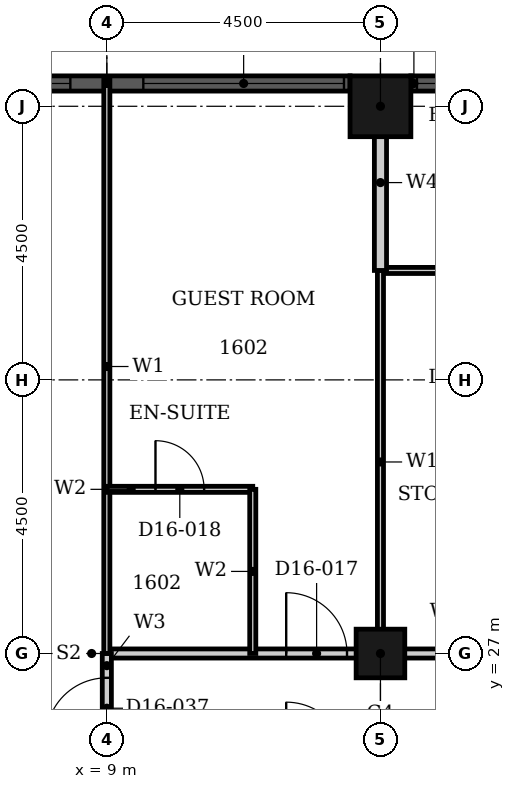
"""IFC4 building model, lengths in metres.
Left out: names, types, materials, properties, quantities, classifications, styles, units other than length and angle.
Written with IfcOpenShell. Run it as: python <this file> out.ifc"""

import sys

from ifc_helpers import new_model, si_unit, direction, frame, frame_2d, origin, origin_2d, place, context, subcontext, project, spatial, rectangle, hollow_rectangle, extrude, element, fill, save


model = new_model("IFC4")
c1 = context("Model", 3, precision=1e-05, world=origin(), true_north=direction((0.0, 1.0)))
c2 = subcontext(c1, "Body", "Model", "MODEL_VIEW")
j1 = project(units=[si_unit("LENGTHUNIT", "METRE"), si_unit("PLANEANGLEUNIT", "RADIAN")], contexts=[c1])
p1 = place(None, origin())
s1 = spatial("IfcSite", under=j1, at=p1, CompositionType="ELEMENT")
p2 = place(p1, origin())
s2 = spatial("IfcBuilding", under=s1, at=p2, CompositionType="ELEMENT")
p3 = place(p2, frame((0.0, 0.0, 70.8)))
s3 = spatial("IfcBuildingStorey", under=s2, at=p3, CompositionType="ELEMENT", Elevation=70.8)
p4 = place(p3, frame((13.5, 36.0, 0.0), z_axis=(0.0, 0.0, 1.0), x_axis=(1.0, 0.0, 0.0)))
e1 = element("IfcColumn", 1, at=p4, inside=s3, PredefinedType="COLUMN", context=c2, shape_type="SweptSolid", body=[
    extrude(hollow_rectangle(XDim=1.0, YDim=1.0, WallThickness=0.032, at=origin_2d()), origin(), (0.0, 0.0, 1.0), 3.6),
])
p5 = place(p3, frame((13.5, 27.0, 0.0), z_axis=(0.0, 0.0, 1.0), x_axis=(1.0, 0.0, 0.0)))
e2 = element("IfcColumn", 2, at=p5, inside=s3, PredefinedType="COLUMN", context=c2, shape_type="SweptSolid", body=[
    extrude(hollow_rectangle(XDim=0.8, YDim=0.8, WallThickness=0.025, at=origin_2d()), origin(), (0.0, 0.0, 1.0), 3.6),
])
p6 = place(p3, frame((15.25, 36.375, 0.0), z_axis=(0.0, 0.0, 1.0), x_axis=(-1.0, 0.0, 0.0)))
e3 = element("IfcWall", 3, at=p6, inside=s3, PredefinedType="SOLIDWALL", context=c2, shape_type="SweptSolid", body=[
    extrude(rectangle(XDim=1.25, YDim=0.25, at=frame_2d((0.625, 0.0))), origin(), (0.0, 0.0, 1.0), 3.6),
])
p7 = place(p6, frame((0.1, 0.0, 0.9)))
e4 = element("IfcOpeningElement", 4, at=p7, cuts=e3, PredefinedType="OPENING", context=c2, shape_type="SweptSolid", body=[
    extrude(rectangle(XDim=1.05, YDim=2.08, at=frame_2d((0.525, 1.04))), frame((0.0, 0.135, 0.0), z_axis=(0.0, -1.0, 0.0), x_axis=(1.0, 0.0, 0.0)), (0.0, 0.0, 1.0), 0.27),
])
p8 = place(p3, frame((13.0, 36.375, 0.0), z_axis=(0.0, 0.0, 1.0), x_axis=(-1.0, 0.0, 0.0)))
e5 = element("IfcWall", 5, at=p8, inside=s3, PredefinedType="SOLIDWALL", context=c2, shape_type="SweptSolid", body=[
    extrude(rectangle(XDim=8.0, YDim=0.25, at=frame_2d((4.0, 0.0))), origin(), (0.0, 0.0, 1.0), 3.6),
])
p9 = place(p8, frame((0.1, 0.0, 0.9)))
e6 = element("IfcOpeningElement", 6, at=p9, cuts=e5, PredefinedType="OPENING", context=c2, shape_type="SweptSolid", body=[
    extrude(rectangle(XDim=3.3, YDim=2.08, at=frame_2d((1.65, 1.04))), frame((0.0, 0.135, 0.0), z_axis=(0.0, -1.0, 0.0), x_axis=(1.0, 0.0, 0.0)), (0.0, 0.0, 1.0), 0.27),
])
p10 = place(p8, frame((4.6, 0.0, 0.9)))
e7 = element("IfcOpeningElement", 7, at=p10, cuts=e5, PredefinedType="OPENING", context=c2, shape_type="SweptSolid", body=[
    extrude(rectangle(XDim=3.3, YDim=2.08, at=frame_2d((1.65, 1.04))), frame((0.0, 0.135, 0.0), z_axis=(0.0, -1.0, 0.0), x_axis=(1.0, 0.0, 0.0)), (0.0, 0.0, 1.0), 0.27),
])
p11 = place(p3, frame((9.0, 27.0, 0.0), z_axis=(0.0, 0.0, 1.0), x_axis=(1.0, 0.0, 0.0)))
e8 = element("IfcWall", 8, at=p11, inside=s3, PredefinedType="PARTITIONING", context=c2, shape_type="SweptSolid", body=[
    extrude(rectangle(XDim=7.2, YDim=0.15, at=frame_2d((3.6, 0.0))), origin(), (0.0, 0.0, 1.0), 2.58),
])
p12 = place(p11, frame((2.95, 0.0, 0.0)))
e9 = element("IfcOpeningElement", 9, at=p12, cuts=e8, PredefinedType="OPENING", context=c2, shape_type="SweptSolid", body=[
    extrude(rectangle(XDim=1.0, YDim=2.1, at=frame_2d((0.5, 1.05))), frame((0.0, 0.085, 0.0), z_axis=(0.0, -1.0, 0.0), x_axis=(1.0, 0.0, 0.0)), (0.0, 0.0, 1.0), 0.17),
])
p13 = place(p3, frame((9.0, 25.2, 0.0), z_axis=(0.0, 0.0, 1.0), x_axis=(0.0, 1.0, 0.0)))
e10 = element("IfcWall", 10, at=p13, inside=s3, PredefinedType="PARTITIONING", context=c2, shape_type="SweptSolid", body=[
    extrude(rectangle(XDim=1.8, YDim=0.15, at=frame_2d((0.9, 0.0))), origin(), (0.0, 0.0, 1.0), 3.3),
])
p14 = place(p13, frame((0.4, 0.0, 0.0)))
e11 = element("IfcOpeningElement", 11, at=p14, cuts=e10, PredefinedType="OPENING", context=c2, shape_type="SweptSolid", body=[
    extrude(rectangle(XDim=1.0, YDim=2.1, at=frame_2d((0.5, 1.05))), frame((0.0, 0.085, 0.0), z_axis=(0.0, -1.0, 0.0), x_axis=(1.0, 0.0, 0.0)), (0.0, 0.0, 1.0), 0.17),
])
p15 = place(p3, frame((13.5, 33.3, 0.0), z_axis=(0.0, 0.0, 1.0), x_axis=(1.0, 0.0, 0.0)))
e12 = element("IfcWall", 12, at=p15, inside=s3, PredefinedType="PARTITIONING", context=c2, shape_type="SweptSolid", body=[
    extrude(rectangle(XDim=2.7, YDim=0.1, at=frame_2d((1.35, 0.0))), origin(), (0.0, 0.0, 1.0), 3.3),
])
p16 = place(p3, frame((13.5, 27.0, 0.0), z_axis=(0.0, 0.0, 1.0), x_axis=(0.0, 1.0, 0.0)))
e13 = element("IfcWall", 13, at=p16, inside=s3, PredefinedType="PARTITIONING", context=c2, shape_type="SweptSolid", body=[
    extrude(rectangle(XDim=6.3, YDim=0.1, at=frame_2d((3.15, 0.0))), origin(), (0.0, 0.0, 1.0), 2.38),
])
p17 = place(p3, frame((9.0, 27.0, 0.0), z_axis=(0.0, 0.0, 1.0), x_axis=(0.0, 1.0, 0.0)))
e14 = element("IfcWall", 14, at=p17, inside=s3, PredefinedType="PARTITIONING", context=c2, shape_type="SweptSolid", body=[
    extrude(rectangle(XDim=9.44, YDim=0.1, at=frame_2d((4.72, 0.0))), origin(), (0.0, 0.0, 1.0), 3.3),
])
p18 = place(p3, frame((13.5, 33.3, 0.0), z_axis=(0.0, 0.0, 1.0), x_axis=(0.0, 1.0, 0.0)))
e15 = element("IfcWall", 15, at=p18, inside=s3, PredefinedType="PARTITIONING", context=c2, shape_type="SweptSolid", body=[
    extrude(rectangle(XDim=2.89, YDim=0.2, at=frame_2d((1.445, 0.0))), origin(), (0.0, 0.0, 1.0), 2.38),
])
p19 = place(p3, frame((9.0, 29.7, 0.0), z_axis=(0.0, 0.0, 1.0), x_axis=(1.0, 0.0, 0.0)))
e16 = element("IfcWall", 16, at=p19, inside=s3, PredefinedType="PARTITIONING", context=c2, shape_type="SweptSolid", body=[
    extrude(rectangle(XDim=2.4, YDim=0.1, at=frame_2d((1.2, 0.0))), origin(), (0.0, 0.0, 1.0), 3.3),
])
p20 = place(p19, frame((0.8, 0.0, 0.0)))
e17 = element("IfcOpeningElement", 17, at=p20, cuts=e16, PredefinedType="OPENING", context=c2, shape_type="SweptSolid", body=[
    extrude(rectangle(XDim=0.8, YDim=2.1, at=frame_2d((0.4, 1.05))), frame((0.0, 0.06, 0.0), z_axis=(0.0, -1.0, 0.0), x_axis=(1.0, 0.0, 0.0)), (0.0, 0.0, 1.0), 0.12),
])
p21 = place(p3, frame((11.4, 27.0, 0.0), z_axis=(0.0, 0.0, 1.0), x_axis=(0.0, 1.0, 0.0)))
e18 = element("IfcWall", 18, at=p21, inside=s3, PredefinedType="PARTITIONING", context=c2, shape_type="SweptSolid", body=[
    extrude(rectangle(XDim=2.7, YDim=0.1, at=frame_2d((1.35, 0.0))), origin(), (0.0, 0.0, 1.0), 3.3),
])
p22 = place(p7, origin())
e19 = element("IfcWindow", 19, at=p22, inside=s3, PartitioningType="SINGLE_PANEL", PredefinedType="WINDOW", context=c2, shape_type="SweptSolid", body=[
    extrude(rectangle(XDim=1.05, YDim=2.08, at=frame_2d((0.525, 1.04))), frame((0.0, 0.03, 0.0), z_axis=(0.0, -1.0, 0.0), x_axis=(1.0, 0.0, 0.0)), (0.0, 0.0, 1.0), 0.06),
])
fill(e4, e19)
p23 = place(p9, origin())
e20 = element("IfcWindow", 20, at=p23, inside=s3, PartitioningType="SINGLE_PANEL", PredefinedType="WINDOW", context=c2, shape_type="SweptSolid", body=[
    extrude(rectangle(XDim=3.3, YDim=2.08, at=frame_2d((1.65, 1.04))), frame((0.0, 0.03, 0.0), z_axis=(0.0, -1.0, 0.0), x_axis=(1.0, 0.0, 0.0)), (0.0, 0.0, 1.0), 0.06),
])
fill(e6, e20)
p24 = place(p10, origin())
e21 = element("IfcWindow", 21, at=p24, inside=s3, PartitioningType="SINGLE_PANEL", PredefinedType="WINDOW", context=c2, shape_type="SweptSolid", body=[
    extrude(rectangle(XDim=3.3, YDim=2.08, at=frame_2d((1.65, 1.04))), frame((0.0, 0.03, 0.0), z_axis=(0.0, -1.0, 0.0), x_axis=(1.0, 0.0, 0.0)), (0.0, 0.0, 1.0), 0.06),
])
fill(e7, e21)
p25 = place(p12, origin())
e22 = element("IfcDoor", 22, at=p25, inside=s3, OperationType="SINGLE_SWING_RIGHT", PredefinedType="DOOR", context=c2, shape_type="SweptSolid", body=[
    extrude(rectangle(XDim=1.0, YDim=2.1, at=frame_2d((0.5, 1.05))), frame((0.0, 0.025, 0.0), z_axis=(0.0, -1.0, 0.0), x_axis=(1.0, 0.0, 0.0)), (0.0, 0.0, 1.0), 0.05),
])
fill(e9, e22)
p26 = place(p20, origin())
e23 = element("IfcDoor", 23, at=p26, inside=s3, OperationType="SINGLE_SWING_RIGHT", PredefinedType="DOOR", context=c2, shape_type="SweptSolid", body=[
    extrude(rectangle(XDim=0.8, YDim=2.1, at=frame_2d((0.4, 1.05))), frame((0.0, 0.025, 0.0), z_axis=(0.0, -1.0, 0.0), x_axis=(1.0, 0.0, 0.0)), (0.0, 0.0, 1.0), 0.05),
])
fill(e17, e23)
p27 = place(p14, origin())
e24 = element("IfcDoor", 24, at=p27, inside=s3, OperationType="SINGLE_SWING_RIGHT", PredefinedType="DOOR", context=c2, shape_type="SweptSolid", body=[
    extrude(rectangle(XDim=1.0, YDim=2.1, at=frame_2d((0.5, 1.05))), frame((0.0, 0.025, 0.0), z_axis=(0.0, -1.0, 0.0), x_axis=(1.0, 0.0, 0.0)), (0.0, 0.0, 1.0), 0.05),
])
fill(e11, e24)
save(model, sys.argv[1])
